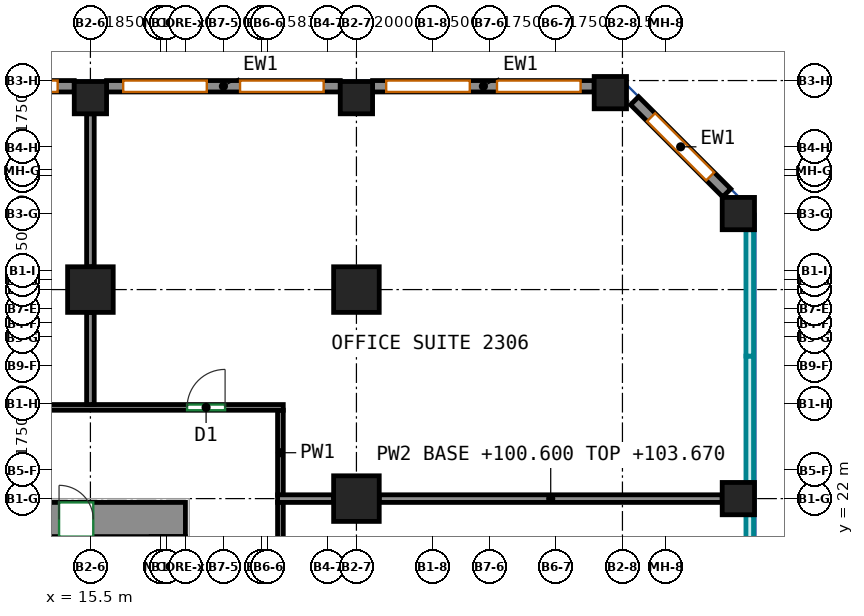
"""IFC4 building model, lengths in metres.
Left out: names, types, materials, properties, quantities, classifications, styles, units other than length and angle.
Written with IfcOpenShell. Run it as: python <this file> out.ifc"""

import sys

from ifc_helpers import new_model, si_unit, direction, frame, frame_2d, origin, origin_2d, place, context, subcontext, project, spatial, rectangle, extrude, source, transform, mapped, element, fill, save


model = new_model("IFC4")
c1 = context("Model", 3, precision=1e-05, world=origin(), true_north=direction((0.0, 1.0)))
c2 = subcontext(c1, "Body", "Model", "MODEL_VIEW")
j1 = project(units=[si_unit("LENGTHUNIT", "METRE"), si_unit("PLANEANGLEUNIT", "RADIAN")], contexts=[c1])
p1 = place(None, origin())
s1 = spatial("IfcSite", under=j1, at=p1, CompositionType="ELEMENT")
p2 = place(p1, origin())
s2 = spatial("IfcBuilding", under=s1, at=p2, CompositionType="ELEMENT")
p3 = place(p2, frame((0.0, 0.0, 100.6)))
s3 = spatial("IfcBuildingStorey", under=s2, at=p3, CompositionType="ELEMENT", Elevation=100.6)
m1 = source(origin(), c2, "Body", "SweptSolid", [
    extrude(rectangle(XDim=1.2, YDim=1.2, at=origin_2d()), origin(), (0.0, 0.0, 1.0), 3.72),
])
p4 = place(p3, frame((15.5, 27.5, 0.0), z_axis=(0.0, 0.0, 1.0), x_axis=(1.0, 0.0, 0.0)))
e1 = element("IfcColumn", 1, at=p4, inside=s3, PredefinedType="COLUMN", context=c2, shape_type="MappedRepresentation", body=[
    mapped(m1, transform((0.0, 0.0, 0.0))),
])
m2 = source(origin(), c2, "Body", "SweptSolid", [
    extrude(rectangle(XDim=0.85, YDim=0.85, at=origin_2d()), origin(), (0.0, 0.0, 1.0), 3.72),
])
p5 = place(p3, frame((15.5, 32.55, 0.0), z_axis=(0.0, 0.0, 1.0), x_axis=(1.0, 0.0, 0.0)))
e2 = element("IfcColumn", 2, at=p5, inside=s3, PredefinedType="COLUMN", context=c2, shape_type="MappedRepresentation", body=[
    mapped(m2, transform((0.0, 0.0, 0.0))),
])
for number, where, z_axis, x_axis in (
    (3, (22.5, 22.0, 0.0), (0.0, 0.0, 1.0), (1.0, 0.0, 0.0)),
    (4, (22.5, 27.5, 0.0), (0.0, 0.0, 1.0), (1.0, 0.0, 0.0)),
):
    element("IfcColumn", number, at=place(p3, frame(where, z_axis=z_axis, x_axis=x_axis)), inside=s3, PredefinedType="COLUMN", context=c2, shape_type="MappedRepresentation", body=[
        mapped(m1, transform((0.0, 0.0, 0.0))),
    ])
for number, where, z_axis, x_axis in (
    (5, (22.5, 32.55, 0.0), (0.0, 0.0, 1.0), (1.0, 0.0, 0.0)),
    (6, (29.182, 32.682, 0.0), (0.0, 0.0, 1.0), (1.0, 0.0, 0.0)),
    (7, (32.55, 22.0, 0.0), (0.0, 0.0, 1.0), (1.0, 0.0, 0.0)),
    (8, (32.55, 29.5, 0.0), (0.0, 0.0, 1.0), (1.0, 0.0, 0.0)),
):
    element("IfcColumn", number, at=place(p3, frame(where, z_axis=z_axis, x_axis=x_axis)), inside=s3, PredefinedType="COLUMN", context=c2, shape_type="MappedRepresentation", body=[
        mapped(m2, transform((0.0, 0.0, 0.0))),
    ])
m3 = source(origin(), c2, "Body", "SweptSolid", [
    extrude(rectangle(XDim=33.9, YDim=0.9, at=frame_2d((16.95, 0.0))), origin(), (0.0, 0.0, 1.0), 3.72),
])
p6 = place(p3, frame((-15.9, 21.45, 0.0), z_axis=(0.0, 0.0, 1.0), x_axis=(1.0, 0.0, 0.0)))
e9 = element("IfcWall", 9, at=p6, inside=s3, PredefinedType="SHEAR", context=c2, shape_type="MappedRepresentation", body=[
    mapped(m3, transform((0.0, 0.0, 0.0))),
])
p7 = place(p6, frame((6.008, 0.0, 0.0)))
e10 = element("IfcOpeningElement", 10, at=p7, cuts=e9, PredefinedType="OPENING", context=c2, shape_type="SweptSolid", body=[
    extrude(rectangle(XDim=0.9, YDim=2.1, at=frame_2d((0.45, 1.05))), frame((0.0, 0.46, 0.0), z_axis=(0.0, -1.0, 0.0), x_axis=(1.0, 0.0, 0.0)), (0.0, 0.0, 1.0), 0.92),
])
p8 = place(p6, frame((8.688, 0.0, 0.0)))
e11 = element("IfcOpeningElement", 11, at=p8, cuts=e9, PredefinedType="OPENING", context=c2, shape_type="SweptSolid", body=[
    extrude(rectangle(XDim=0.9, YDim=2.1, at=frame_2d((0.45, 1.05))), frame((0.0, 0.46, 0.0), z_axis=(0.0, -1.0, 0.0), x_axis=(1.0, 0.0, 0.0)), (0.0, 0.0, 1.0), 0.92),
])
p9 = place(p6, frame((12.185, 0.0, 0.0)))
e12 = element("IfcOpeningElement", 12, at=p9, cuts=e9, PredefinedType="OPENING", context=c2, shape_type="SweptSolid", body=[
    extrude(rectangle(XDim=0.9, YDim=2.1, at=frame_2d((0.45, 1.05))), frame((0.0, 0.46, 0.0), z_axis=(0.0, -1.0, 0.0), x_axis=(1.0, 0.0, 0.0)), (0.0, 0.0, 1.0), 0.92),
])
p10 = place(p6, frame((16.138, 0.0, 0.0)))
e13 = element("IfcOpeningElement", 13, at=p10, cuts=e9, PredefinedType="OPENING", context=c2, shape_type="SweptSolid", body=[
    extrude(rectangle(XDim=0.9, YDim=2.1, at=frame_2d((0.45, 1.05))), frame((0.0, 0.46, 0.0), z_axis=(0.0, -1.0, 0.0), x_axis=(1.0, 0.0, 0.0)), (0.0, 0.0, 1.0), 0.92),
])
p11 = place(p6, frame((20.962, 0.0, 0.0)))
e14 = element("IfcOpeningElement", 14, at=p11, cuts=e9, PredefinedType="OPENING", context=c2, shape_type="SweptSolid", body=[
    extrude(rectangle(XDim=0.9, YDim=2.1, at=frame_2d((0.45, 1.05))), frame((0.0, 0.46, 0.0), z_axis=(0.0, -1.0, 0.0), x_axis=(1.0, 0.0, 0.0)), (0.0, 0.0, 1.0), 0.92),
])
p12 = place(p6, frame((26.389, 0.0, 0.0)))
e15 = element("IfcOpeningElement", 15, at=p12, cuts=e9, PredefinedType="OPENING", context=c2, shape_type="SweptSolid", body=[
    extrude(rectangle(XDim=0.9, YDim=2.1, at=frame_2d((0.45, 1.05))), frame((0.0, 0.46, 0.0), z_axis=(0.0, -1.0, 0.0), x_axis=(1.0, 0.0, 0.0)), (0.0, 0.0, 1.0), 0.92),
])
p13 = place(p6, frame((2.425, 0.0, 0.0)))
e16 = element("IfcOpeningElement", 16, at=p13, cuts=e9, PredefinedType="OPENING", context=c2, shape_type="SweptSolid", body=[
    extrude(rectangle(XDim=0.9, YDim=2.1, at=frame_2d((0.45, 1.05))), frame((0.0, 0.46, 0.0), z_axis=(0.0, -1.0, 0.0), x_axis=(1.0, 0.0, 0.0)), (0.0, 0.0, 1.0), 0.92),
])
p14 = place(p6, frame((30.575, 0.0, 0.0)))
e17 = element("IfcOpeningElement", 17, at=p14, cuts=e9, PredefinedType="OPENING", context=c2, shape_type="SweptSolid", body=[
    extrude(rectangle(XDim=0.9, YDim=2.1, at=frame_2d((0.45, 1.05))), frame((0.0, 0.46, 0.0), z_axis=(0.0, -1.0, 0.0), x_axis=(1.0, 0.0, 0.0)), (0.0, 0.0, 1.0), 0.92),
])
m4 = source(origin(), c2, "Body", "SweptSolid", [
    extrude(rectangle(XDim=3.429, YDim=0.3, at=frame_2d((1.715, 0.0))), origin(), (0.0, 0.0, 1.0), 3.72),
])
p15 = place(p3, frame((32.244, 30.044, 0.0), z_axis=(0.0, 0.0, 1.0), x_axis=(-0.707106781187, 0.707106781187, 0.0)))
e18 = element("IfcWall", 18, at=p15, inside=s3, PredefinedType="SOLIDWALL", context=c2, shape_type="MappedRepresentation", body=[
    mapped(m4, transform((0.0, 0.0, 0.0))),
])
p16 = place(p15, frame((0.615, 0.0, 0.7)))
e19 = element("IfcOpeningElement", 19, at=p16, cuts=e18, PredefinedType="OPENING", context=c2, shape_type="SweptSolid", body=[
    extrude(rectangle(XDim=2.2, YDim=2.25, at=frame_2d((1.1, 1.125))), frame((0.0, 0.16, 0.0), z_axis=(0.0, -1.0, 0.0), x_axis=(1.0, 0.0, 0.0)), (0.0, 0.0, 1.0), 0.32),
])
m5 = source(origin(), c2, "Body", "SweptSolid", [
    extrude(rectangle(XDim=5.832, YDim=0.3, at=frame_2d((2.916, 0.0))), origin(), (0.0, 0.0, 1.0), 3.72),
])
p17 = place(p3, frame((28.757, 32.85, 0.0), z_axis=(0.0, 0.0, 1.0), x_axis=(-1.0, 0.0, 0.0)))
e20 = element("IfcWall", 20, at=p17, inside=s3, PredefinedType="SOLIDWALL", context=c2, shape_type="MappedRepresentation", body=[
    mapped(m5, transform((0.0, 0.0, 0.0))),
])
p18 = place(p17, frame((0.358, 0.0, 0.7)))
e21 = element("IfcOpeningElement", 21, at=p18, cuts=e20, PredefinedType="OPENING", context=c2, shape_type="SweptSolid", body=[
    extrude(rectangle(XDim=2.2, YDim=2.25, at=frame_2d((1.1, 1.125))), frame((0.0, 0.16, 0.0), z_axis=(0.0, -1.0, 0.0), x_axis=(1.0, 0.0, 0.0)), (0.0, 0.0, 1.0), 0.32),
])
p19 = place(p17, frame((3.274, 0.0, 0.7)))
e22 = element("IfcOpeningElement", 22, at=p19, cuts=e20, PredefinedType="OPENING", context=c2, shape_type="SweptSolid", body=[
    extrude(rectangle(XDim=2.2, YDim=2.25, at=frame_2d((1.1, 1.125))), frame((0.0, 0.16, 0.0), z_axis=(0.0, -1.0, 0.0), x_axis=(1.0, 0.0, 0.0)), (0.0, 0.0, 1.0), 0.32),
])
m6 = source(origin(), c2, "Body", "SweptSolid", [
    extrude(rectangle(XDim=6.15, YDim=0.3, at=frame_2d((3.075, 0.0))), origin(), (0.0, 0.0, 1.0), 3.72),
])
p20 = place(p3, frame((22.075, 32.85, 0.0), z_axis=(0.0, 0.0, 1.0), x_axis=(-1.0, 0.0, 0.0)))
e23 = element("IfcWall", 23, at=p20, inside=s3, PredefinedType="SOLIDWALL", context=c2, shape_type="MappedRepresentation", body=[
    mapped(m6, transform((0.0, 0.0, 0.0))),
])
p21 = place(p20, frame((0.438, 0.0, 0.7)))
e24 = element("IfcOpeningElement", 24, at=p21, cuts=e23, PredefinedType="OPENING", context=c2, shape_type="SweptSolid", body=[
    extrude(rectangle(XDim=2.2, YDim=2.25, at=frame_2d((1.1, 1.125))), frame((0.0, 0.16, 0.0), z_axis=(0.0, -1.0, 0.0), x_axis=(1.0, 0.0, 0.0)), (0.0, 0.0, 1.0), 0.32),
])
p22 = place(p20, frame((3.512, 0.0, 0.7)))
e25 = element("IfcOpeningElement", 25, at=p22, cuts=e23, PredefinedType="OPENING", context=c2, shape_type="SweptSolid", body=[
    extrude(rectangle(XDim=2.2, YDim=2.25, at=frame_2d((1.1, 1.125))), frame((0.0, 0.16, 0.0), z_axis=(0.0, -1.0, 0.0), x_axis=(1.0, 0.0, 0.0)), (0.0, 0.0, 1.0), 0.32),
])
p23 = place(p3, frame((15.075, 32.85, 0.0), z_axis=(0.0, 0.0, 1.0), x_axis=(-1.0, 0.0, 0.0)))
e26 = element("IfcWall", 26, at=p23, inside=s3, PredefinedType="SOLIDWALL", context=c2, shape_type="MappedRepresentation", body=[
    mapped(m6, transform((0.0, 0.0, 0.0))),
])
p24 = place(p23, frame((0.438, 0.0, 0.7)))
e27 = element("IfcOpeningElement", 27, at=p24, cuts=e26, PredefinedType="OPENING", context=c2, shape_type="SweptSolid", body=[
    extrude(rectangle(XDim=2.2, YDim=2.25, at=frame_2d((1.1, 1.125))), frame((0.0, 0.16, 0.0), z_axis=(0.0, -1.0, 0.0), x_axis=(1.0, 0.0, 0.0)), (0.0, 0.0, 1.0), 0.32),
])
p25 = place(p23, frame((3.512, 0.0, 0.7)))
e28 = element("IfcOpeningElement", 28, at=p25, cuts=e26, PredefinedType="OPENING", context=c2, shape_type="SweptSolid", body=[
    extrude(rectangle(XDim=2.2, YDim=2.25, at=frame_2d((1.1, 1.125))), frame((0.0, 0.16, 0.0), z_axis=(0.0, -1.0, 0.0), x_axis=(1.0, 0.0, 0.0)), (0.0, 0.0, 1.0), 0.32),
])
p26 = place(p3, frame((20.5, 17.75, 0.0), z_axis=(0.0, 0.0, 1.0), x_axis=(0.0, 1.0, 0.0)))
e29 = element("IfcWall", 29, at=p26, inside=s3, PredefinedType="PARTITIONING", context=c2, shape_type="SweptSolid", body=[
    extrude(rectangle(XDim=4.16, YDim=0.15, at=frame_2d((2.08, 0.0))), origin(), (0.0, 0.0, 1.0), 3.72),
])
p27 = place(p26, frame((1.324, 0.0, 0.0)))
e30 = element("IfcOpeningElement", 30, at=p27, cuts=e29, PredefinedType="OPENING", context=c2, shape_type="SweptSolid", body=[
    extrude(rectangle(XDim=0.9, YDim=2.1, at=frame_2d((0.45, 1.05))), frame((0.0, 0.085, 0.0), z_axis=(0.0, -1.0, 0.0), x_axis=(1.0, 0.0, 0.0)), (0.0, 0.0, 1.0), 0.17),
])
p28 = place(p3, frame((20.5, 22.09, 0.0), z_axis=(0.0, 0.0, 1.0), x_axis=(0.0, 1.0, 0.0)))
e31 = element("IfcWall", 31, at=p28, inside=s3, PredefinedType="PARTITIONING", context=c2, shape_type="SweptSolid", body=[
    extrude(rectangle(XDim=2.235, YDim=0.15, at=frame_2d((1.117, 0.0))), origin(), (0.0, 0.0, 1.0), 3.72),
])
p29 = place(p3, frame((-19.575, 24.4, 0.0), z_axis=(0.0, 0.0, 1.0), x_axis=(1.0, 0.0, 0.0)))
e32 = element("IfcWall", 32, at=p29, inside=s3, PredefinedType="PARTITIONING", context=c2, shape_type="SweptSolid", body=[
    extrude(rectangle(XDim=40.15, YDim=0.15, at=frame_2d((20.075, 0.0))), origin(), (0.0, 0.0, 1.0), 3.72),
])
p30 = place(p29, frame((9.974, 0.0, 0.0)))
e33 = element("IfcOpeningElement", 33, at=p30, cuts=e32, PredefinedType="OPENING", context=c2, shape_type="SweptSolid", body=[
    extrude(rectangle(XDim=0.9, YDim=2.1, at=frame_2d((0.45, 1.05))), frame((0.0, 0.085, 0.0), z_axis=(0.0, -1.0, 0.0), x_axis=(1.0, 0.0, 0.0)), (0.0, 0.0, 1.0), 0.17),
])
p31 = place(p29, frame((15.57, 0.0, 0.0)))
e34 = element("IfcOpeningElement", 34, at=p31, cuts=e32, PredefinedType="OPENING", context=c2, shape_type="SweptSolid", body=[
    extrude(rectangle(XDim=0.9, YDim=2.1, at=frame_2d((0.45, 1.05))), frame((0.0, 0.085, 0.0), z_axis=(0.0, -1.0, 0.0), x_axis=(1.0, 0.0, 0.0)), (0.0, 0.0, 1.0), 0.17),
])
p32 = place(p29, frame((26.373, 0.0, 0.0)))
e35 = element("IfcOpeningElement", 35, at=p32, cuts=e32, PredefinedType="OPENING", context=c2, shape_type="SweptSolid", body=[
    extrude(rectangle(XDim=1.0, YDim=2.1, at=frame_2d((0.5, 1.05))), frame((0.0, 0.085, 0.0), z_axis=(0.0, -1.0, 0.0), x_axis=(1.0, 0.0, 0.0)), (0.0, 0.0, 1.0), 0.17),
])
p33 = place(p29, frame((37.619, 0.0, 0.0)))
e36 = element("IfcOpeningElement", 36, at=p33, cuts=e32, PredefinedType="OPENING", context=c2, shape_type="SweptSolid", body=[
    extrude(rectangle(XDim=1.0, YDim=2.1, at=frame_2d((0.5, 1.05))), frame((0.0, 0.085, 0.0), z_axis=(0.0, -1.0, 0.0), x_axis=(1.0, 0.0, 0.0)), (0.0, 0.0, 1.0), 0.17),
])
p34 = place(p3, frame((23.1, 22.0, 0.0), z_axis=(0.0, 0.0, 1.0), x_axis=(1.0, 0.0, 0.0)))
e37 = element("IfcWall", 37, at=p34, inside=s3, PredefinedType="PARTITIONING", context=c2, shape_type="SweptSolid", body=[
    extrude(rectangle(XDim=9.025, YDim=0.2, at=frame_2d((4.512, 0.0))), origin(), (0.0, 0.0, 1.0), 3.07),
])
p35 = place(p3, frame((20.426, 22.0, 0.0), z_axis=(0.0, 0.0, 1.0), x_axis=(1.0, 0.0, 0.0)))
e38 = element("IfcWall", 38, at=p35, inside=s3, PredefinedType="PARTITIONING", context=c2, shape_type="SweptSolid", body=[
    extrude(rectangle(XDim=1.474, YDim=0.2, at=frame_2d((0.737, 0.0))), origin(), (0.0, 0.0, 1.0), 3.72),
])
p36 = place(p3, frame((15.5, 28.1, 0.0), z_axis=(0.0, 0.0, 1.0), x_axis=(0.0, 1.0, 0.0)))
e39 = element("IfcWall", 39, at=p36, inside=s3, PredefinedType="PARTITIONING", context=c2, shape_type="SweptSolid", body=[
    extrude(rectangle(XDim=4.025, YDim=0.2, at=frame_2d((2.012, 0.0))), origin(), (0.0, 0.0, 1.0), 3.72),
])
p37 = place(p3, frame((15.5, 24.476, 0.0), z_axis=(0.0, 0.0, 1.0), x_axis=(0.0, 1.0, 0.0)))
e40 = element("IfcWall", 40, at=p37, inside=s3, PredefinedType="PARTITIONING", context=c2, shape_type="SweptSolid", body=[
    extrude(rectangle(XDim=2.424, YDim=0.2, at=frame_2d((1.212, 0.0))), origin(), (0.0, 0.0, 1.0), 3.72),
])
p38 = place(p16, origin())
e41 = element("IfcWindow", 41, at=p38, inside=s3, PartitioningType="SINGLE_PANEL", PredefinedType="WINDOW", context=c2, shape_type="SweptSolid", body=[
    extrude(rectangle(XDim=2.2, YDim=2.25, at=frame_2d((1.1, 1.125))), frame((0.0, 0.03, 0.0), z_axis=(0.0, -1.0, 0.0), x_axis=(1.0, 0.0, 0.0)), (0.0, 0.0, 1.0), 0.06),
])
fill(e19, e41)
p39 = place(p18, origin())
e42 = element("IfcWindow", 42, at=p39, inside=s3, PartitioningType="SINGLE_PANEL", PredefinedType="WINDOW", context=c2, shape_type="SweptSolid", body=[
    extrude(rectangle(XDim=2.2, YDim=2.25, at=frame_2d((1.1, 1.125))), frame((0.0, 0.03, 0.0), z_axis=(0.0, -1.0, 0.0), x_axis=(1.0, 0.0, 0.0)), (0.0, 0.0, 1.0), 0.06),
])
fill(e21, e42)
p40 = place(p19, origin())
e43 = element("IfcWindow", 43, at=p40, inside=s3, PartitioningType="SINGLE_PANEL", PredefinedType="WINDOW", context=c2, shape_type="SweptSolid", body=[
    extrude(rectangle(XDim=2.2, YDim=2.25, at=frame_2d((1.1, 1.125))), frame((0.0, 0.03, 0.0), z_axis=(0.0, -1.0, 0.0), x_axis=(1.0, 0.0, 0.0)), (0.0, 0.0, 1.0), 0.06),
])
fill(e22, e43)
p41 = place(p21, origin())
e44 = element("IfcWindow", 44, at=p41, inside=s3, PartitioningType="SINGLE_PANEL", PredefinedType="WINDOW", context=c2, shape_type="SweptSolid", body=[
    extrude(rectangle(XDim=2.2, YDim=2.25, at=frame_2d((1.1, 1.125))), frame((0.0, 0.03, 0.0), z_axis=(0.0, -1.0, 0.0), x_axis=(1.0, 0.0, 0.0)), (0.0, 0.0, 1.0), 0.06),
])
fill(e24, e44)
p42 = place(p22, origin())
e45 = element("IfcWindow", 45, at=p42, inside=s3, PartitioningType="SINGLE_PANEL", PredefinedType="WINDOW", context=c2, shape_type="SweptSolid", body=[
    extrude(rectangle(XDim=2.2, YDim=2.25, at=frame_2d((1.1, 1.125))), frame((0.0, 0.03, 0.0), z_axis=(0.0, -1.0, 0.0), x_axis=(1.0, 0.0, 0.0)), (0.0, 0.0, 1.0), 0.06),
])
fill(e25, e45)
p43 = place(p24, origin())
e46 = element("IfcWindow", 46, at=p43, inside=s3, PartitioningType="SINGLE_PANEL", PredefinedType="WINDOW", context=c2, shape_type="SweptSolid", body=[
    extrude(rectangle(XDim=2.2, YDim=2.25, at=frame_2d((1.1, 1.125))), frame((0.0, 0.03, 0.0), z_axis=(0.0, -1.0, 0.0), x_axis=(1.0, 0.0, 0.0)), (0.0, 0.0, 1.0), 0.06),
])
fill(e27, e46)
p44 = place(p14, origin())
e47 = element("IfcDoor", 47, at=p44, inside=s3, OperationType="SINGLE_SWING_LEFT", PredefinedType="DOOR", context=c2, shape_type="SweptSolid", body=[
    extrude(rectangle(XDim=0.9, YDim=2.1, at=frame_2d((0.45, 1.05))), frame((0.0, -0.305, 0.0), z_axis=(0.0, -1.0, 0.0), x_axis=(1.0, 0.0, 0.0)), (0.0, 0.0, 1.0), 0.05),
])
fill(e17, e47)
p45 = place(p33, origin())
e48 = element("IfcDoor", 48, at=p45, inside=s3, OperationType="SINGLE_SWING_RIGHT", PredefinedType="DOOR", context=c2, shape_type="SweptSolid", body=[
    extrude(rectangle(XDim=1.0, YDim=2.1, at=frame_2d((0.5, 1.05))), frame((0.0, 0.025, 0.0), z_axis=(0.0, -1.0, 0.0), x_axis=(1.0, 0.0, 0.0)), (0.0, 0.0, 1.0), 0.05),
])
fill(e36, e48)
save(model, sys.argv[1])
